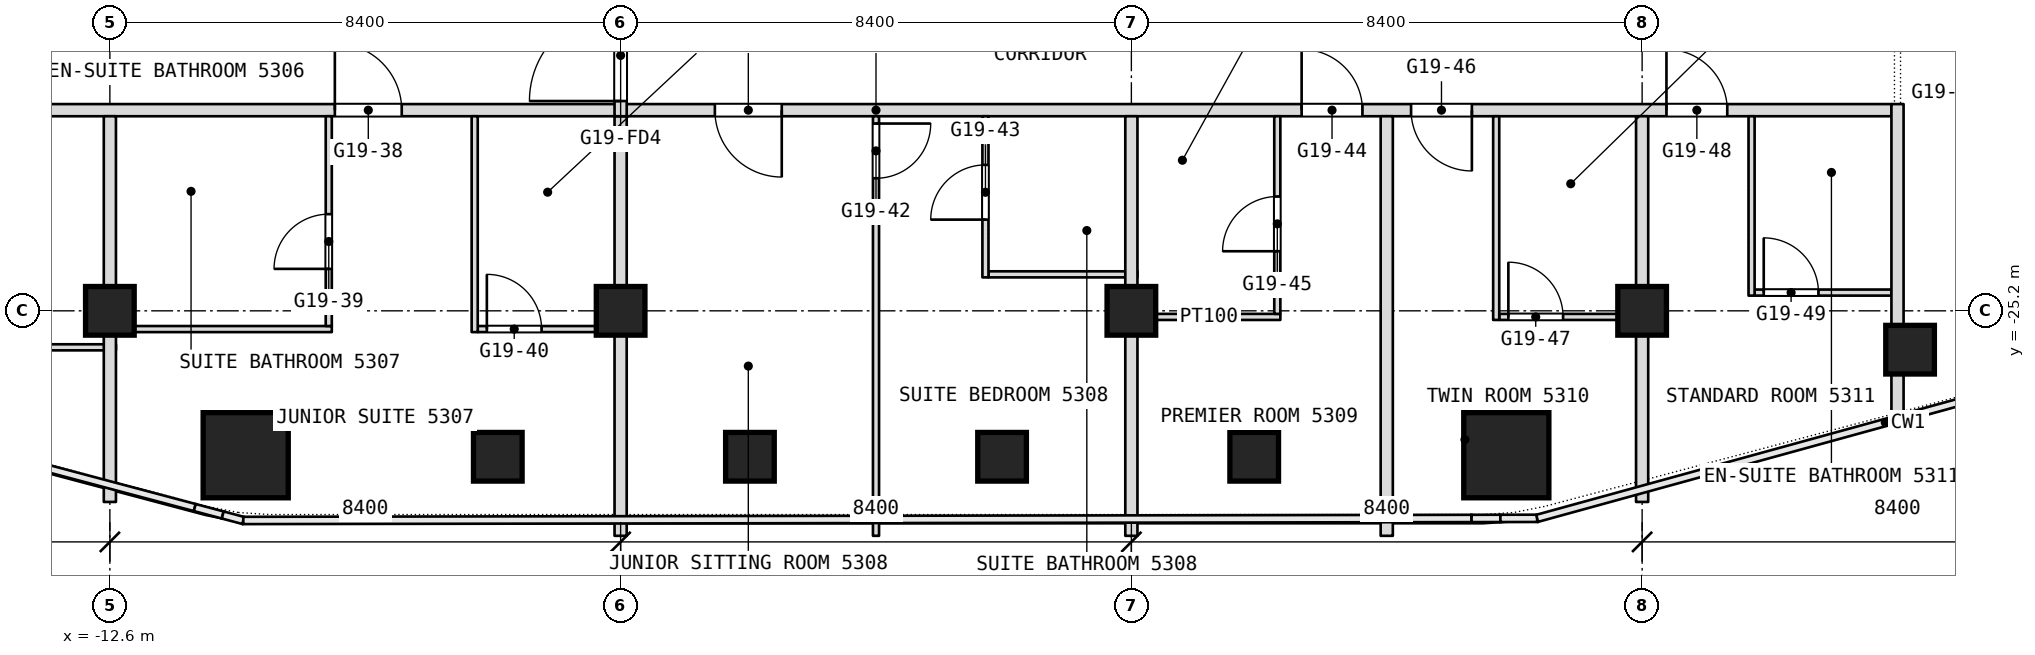
"""IFC4 building model, lengths in metres.
Left out: names, types, materials, properties, quantities, classifications, styles, units other than length and angle.
Written with IfcOpenShell. Run it as: python <this file> out.ifc"""

import sys

from ifc_helpers import new_model, si_unit, direction, frame, frame_2d, origin, origin_2d, place, context, subcontext, project, spatial, rectangle, extrude, element, fill, save


model = new_model("IFC4")
c1 = context("Model", 3, precision=1e-05, world=origin(), true_north=direction((0.0, 1.0)))
c2 = subcontext(c1, "Body", "Model", "MODEL_VIEW")
j1 = project(units=[si_unit("LENGTHUNIT", "METRE"), si_unit("PLANEANGLEUNIT", "RADIAN")], contexts=[c1])
p1 = place(None, origin())
s1 = spatial("IfcSite", under=j1, at=p1, CompositionType="ELEMENT")
p2 = place(p1, origin())
s2 = spatial("IfcBuilding", under=s1, at=p2, CompositionType="ELEMENT")
p3 = place(p2, frame((0.0, 0.0, 227.3)))
s3 = spatial("IfcBuildingStorey", under=s2, at=p3, CompositionType="ELEMENT", Elevation=227.3)
for number, where, z_axis, x_axis in (
    (1, (-10.366, -27.575, 0.0), (0.0, 0.0, 1.0), (1.0, 0.0, 0.0)),
    (2, (10.366, -27.575, 0.0), (0.0, 0.0, 1.0), (1.0, 0.0, 0.0)),
):
    element("IfcColumn", number, at=place(p3, frame(where, z_axis=z_axis, x_axis=x_axis)), inside=s3, PredefinedType="COLUMN", context=c2, shape_type="SweptSolid", body=[
        extrude(rectangle(XDim=1.4, YDim=1.4, at=origin_2d()), origin(), (0.0, 0.0, 1.0), 3.6),
    ])
for number, where, z_axis, x_axis in (
    (3, (-12.6, -25.2, 0.0), (0.0, 0.0, 1.0), (1.0, 0.0, 0.0)),
    (4, (-4.2, -25.2, 0.0), (0.0, 0.0, 1.0), (1.0, 0.0, 0.0)),
    (5, (4.2, -25.2, 0.0), (0.0, 0.0, 1.0), (1.0, 0.0, 0.0)),
    (6, (12.6, -25.2, 0.0), (0.0, 0.0, 1.0), (1.0, 0.0, 0.0)),
    (7, (17.007, -25.839, 0.0), (0.0, 0.0, 1.0), (1.0, 0.0, 0.0)),
    (8, (6.22, -27.6, 0.0), (0.0, 0.0, 1.0), (1.0, 0.0, 0.0)),
    (9, (2.073, -27.6, 0.0), (0.0, 0.0, 1.0), (1.0, 0.0, 0.0)),
    (10, (-2.073, -27.6, 0.0), (0.0, 0.0, 1.0), (1.0, 0.0, 0.0)),
    (11, (-6.22, -27.6, 0.0), (0.0, 0.0, 1.0), (1.0, 0.0, 0.0)),
):
    element("IfcColumn", number, at=place(p3, frame(where, z_axis=z_axis, x_axis=x_axis)), inside=s3, PredefinedType="COLUMN", context=c2, shape_type="SweptSolid", body=[
        extrude(rectangle(XDim=0.8, YDim=0.8, at=origin_2d()), origin(), (0.0, 0.0, 1.0), 3.6),
    ])
p4 = place(p3, frame((-14.95, -25.8, 0.0), z_axis=(0.0, 0.0, 1.0), x_axis=(1.0, 0.0, 0.0)))
e12 = element("IfcWall", 12, at=p4, inside=s3, PredefinedType="PARTITIONING", context=c2, shape_type="SweptSolid", body=[
    extrude(rectangle(XDim=2.45, YDim=0.1, at=frame_2d((1.225, 0.0))), origin(), (0.0, 0.0, 1.0), 3.34),
])
p5 = place(p4, frame((0.15, 0.0, 0.0)))
e13 = element("IfcOpeningElement", 13, at=p5, cuts=e12, PredefinedType="OPENING", context=c2, shape_type="SweptSolid", body=[
    extrude(rectangle(XDim=0.9, YDim=2.1, at=frame_2d((0.45, 1.05))), frame((0.0, 0.05, 0.0), z_axis=(0.0, -1.0, 0.0), x_axis=(1.0, 0.0, 0.0)), (0.0, 0.0, 1.0), 0.1),
])
p6 = place(p3, frame((-12.5, -25.5, 0.0), z_axis=(0.0, 0.0, 1.0), x_axis=(1.0, 0.0, 0.0)))
e14 = element("IfcWall", 14, at=p6, inside=s3, PredefinedType="PARTITIONING", context=c2, shape_type="SweptSolid", body=[
    extrude(rectangle(XDim=3.55, YDim=0.1, at=frame_2d((1.775, 0.0))), origin(), (0.0, 0.0, 1.0), 3.34),
])
p7 = place(p3, frame((-6.55, -25.5, 0.0), z_axis=(0.0, 0.0, 1.0), x_axis=(1.0, 0.0, 0.0)))
e15 = element("IfcWall", 15, at=p7, inside=s3, PredefinedType="PARTITIONING", context=c2, shape_type="SweptSolid", body=[
    extrude(rectangle(XDim=2.45, YDim=0.1, at=frame_2d((1.225, 0.0))), origin(), (0.0, 0.0, 1.0), 3.34),
])
p8 = place(p7, frame((0.15, 0.0, 0.0)))
e16 = element("IfcOpeningElement", 16, at=p8, cuts=e15, PredefinedType="OPENING", context=c2, shape_type="SweptSolid", body=[
    extrude(rectangle(XDim=0.9, YDim=2.1, at=frame_2d((0.45, 1.05))), frame((0.0, 0.05, 0.0), z_axis=(0.0, -1.0, 0.0), x_axis=(1.0, 0.0, 0.0)), (0.0, 0.0, 1.0), 0.1),
])
p9 = place(p3, frame((4.3, -25.3, 0.0), z_axis=(0.0, 0.0, 1.0), x_axis=(1.0, 0.0, 0.0)))
e17 = element("IfcWall", 17, at=p9, inside=s3, PredefinedType="PARTITIONING", context=c2, shape_type="SweptSolid", body=[
    extrude(rectangle(XDim=2.35, YDim=0.1, at=frame_2d((1.175, 0.0))), origin(), (0.0, 0.0, 1.0), 2.94),
])
p10 = place(p3, frame((10.25, -25.3, 0.0), z_axis=(0.0, 0.0, 1.0), x_axis=(1.0, 0.0, 0.0)))
e18 = element("IfcWall", 18, at=p10, inside=s3, PredefinedType="PARTITIONING", context=c2, shape_type="SweptSolid", body=[
    extrude(rectangle(XDim=2.45, YDim=0.1, at=frame_2d((1.225, 0.0))), origin(), (0.0, 0.0, 1.0), 2.94),
])
p11 = place(p10, frame((0.15, 0.0, 0.0)))
e19 = element("IfcOpeningElement", 19, at=p11, cuts=e18, PredefinedType="OPENING", context=c2, shape_type="SweptSolid", body=[
    extrude(rectangle(XDim=0.9, YDim=2.1, at=frame_2d((0.45, 1.05))), frame((0.0, 0.05, 0.0), z_axis=(0.0, -1.0, 0.0), x_axis=(1.0, 0.0, 0.0)), (0.0, 0.0, 1.0), 0.1),
])
p12 = place(p3, frame((14.45, -24.9, 0.0), z_axis=(0.0, 0.0, 1.0), x_axis=(1.0, 0.0, 0.0)))
e20 = element("IfcWall", 20, at=p12, inside=s3, PredefinedType="PARTITIONING", context=c2, shape_type="SweptSolid", body=[
    extrude(rectangle(XDim=2.25, YDim=0.1, at=frame_2d((1.125, 0.0))), origin(), (0.0, 0.0, 1.0), 3.34),
])
p13 = place(p12, frame((0.15, 0.0, 0.0)))
e21 = element("IfcOpeningElement", 21, at=p13, cuts=e20, PredefinedType="OPENING", context=c2, shape_type="SweptSolid", body=[
    extrude(rectangle(XDim=0.9, YDim=2.1, at=frame_2d((0.45, 1.05))), frame((0.0, 0.05, 0.0), z_axis=(0.0, -1.0, 0.0), x_axis=(1.0, 0.0, 0.0)), (0.0, 0.0, 1.0), 0.1),
])
p14 = place(p3, frame((1.85, -24.6, 0.0), z_axis=(0.0, 0.0, 1.0), x_axis=(1.0, 0.0, 0.0)))
e22 = element("IfcWall", 22, at=p14, inside=s3, PredefinedType="PARTITIONING", context=c2, shape_type="SweptSolid", body=[
    extrude(rectangle(XDim=2.45, YDim=0.1, at=frame_2d((1.225, 0.0))), origin(), (0.0, 0.0, 1.0), 3.34),
])
p15 = place(p3, frame((-16.7, -21.9, 0.0), z_axis=(0.0, 0.0, 1.0), x_axis=(1.0, 0.0, 0.0)))
e23 = element("IfcWall", 23, at=p15, inside=s3, PredefinedType="PARTITIONING", context=c2, shape_type="SweptSolid", body=[
    extrude(rectangle(XDim=33.4, YDim=0.2, at=frame_2d((16.7, 0.0))), origin(), (0.0, 0.0, 1.0), 3.34),
])
p16 = place(p15, frame((0.3, 0.0, 0.0)))
e24 = element("IfcOpeningElement", 24, at=p16, cuts=e23, PredefinedType="OPENING", context=c2, shape_type="SweptSolid", body=[
    extrude(rectangle(XDim=1.0, YDim=2.1, at=frame_2d((0.5, 1.05))), frame((0.0, 0.1, 0.0), z_axis=(0.0, -1.0, 0.0), x_axis=(1.0, 0.0, 0.0)), (0.0, 0.0, 1.0), 0.2),
])
p17 = place(p15, frame((7.8, 0.0, 0.0)))
e25 = element("IfcOpeningElement", 25, at=p17, cuts=e23, PredefinedType="OPENING", context=c2, shape_type="SweptSolid", body=[
    extrude(rectangle(XDim=1.1, YDim=2.1, at=frame_2d((0.55, 1.05))), frame((0.0, 0.1, 0.0), z_axis=(0.0, -1.0, 0.0), x_axis=(1.0, 0.0, 0.0)), (0.0, 0.0, 1.0), 0.2),
])
p18 = place(p15, frame((14.05, 0.0, 0.0)))
e26 = element("IfcOpeningElement", 26, at=p18, cuts=e23, PredefinedType="OPENING", context=c2, shape_type="SweptSolid", body=[
    extrude(rectangle(XDim=1.1, YDim=2.1, at=frame_2d((0.55, 1.05))), frame((0.0, 0.1, 0.0), z_axis=(0.0, -1.0, 0.0), x_axis=(1.0, 0.0, 0.0)), (0.0, 0.0, 1.0), 0.2),
])
p19 = place(p15, frame((23.7, 0.0, 0.0)))
e27 = element("IfcOpeningElement", 27, at=p19, cuts=e23, PredefinedType="OPENING", context=c2, shape_type="SweptSolid", body=[
    extrude(rectangle(XDim=1.0, YDim=2.1, at=frame_2d((0.5, 1.05))), frame((0.0, 0.1, 0.0), z_axis=(0.0, -1.0, 0.0), x_axis=(1.0, 0.0, 0.0)), (0.0, 0.0, 1.0), 0.2),
])
p20 = place(p15, frame((25.5, 0.0, 0.0)))
e28 = element("IfcOpeningElement", 28, at=p20, cuts=e23, PredefinedType="OPENING", context=c2, shape_type="SweptSolid", body=[
    extrude(rectangle(XDim=1.0, YDim=2.1, at=frame_2d((0.5, 1.05))), frame((0.0, 0.1, 0.0), z_axis=(0.0, -1.0, 0.0), x_axis=(1.0, 0.0, 0.0)), (0.0, 0.0, 1.0), 0.2),
])
p21 = place(p15, frame((29.7, 0.0, 0.0)))
e29 = element("IfcOpeningElement", 29, at=p21, cuts=e23, PredefinedType="OPENING", context=c2, shape_type="SweptSolid", body=[
    extrude(rectangle(XDim=1.0, YDim=2.1, at=frame_2d((0.5, 1.05))), frame((0.0, 0.1, 0.0), z_axis=(0.0, -1.0, 0.0), x_axis=(1.0, 0.0, 0.0)), (0.0, 0.0, 1.0), 0.2),
])
p22 = place(p3, frame((16.8, -27.229, 0.0), z_axis=(0.0, 0.0, 1.0), x_axis=(0.0, 1.0, 0.0)))
e30 = element("IfcWall", 30, at=p22, inside=s3, PredefinedType="PARTITIONING", context=c2, shape_type="SweptSolid", body=[
    extrude(rectangle(XDim=5.429, YDim=0.2, at=frame_2d((2.714, 0.0))), origin(), (0.0, 0.0, 1.0), 3.34),
])
p23 = place(p3, frame((14.4, -24.95, 0.0), z_axis=(0.0, 0.0, 1.0), x_axis=(0.0, 1.0, 0.0)))
e31 = element("IfcWall", 31, at=p23, inside=s3, PredefinedType="PARTITIONING", context=c2, shape_type="SweptSolid", body=[
    extrude(rectangle(XDim=2.95, YDim=0.1, at=frame_2d((1.475, 0.0))), origin(), (0.0, 0.0, 1.0), 3.34),
])
p24 = place(p3, frame((12.6, -28.343, 0.0), z_axis=(0.0, 0.0, 1.0), x_axis=(0.0, 1.0, 0.0)))
e32 = element("IfcWall", 32, at=p24, inside=s3, PredefinedType="PARTITIONING", context=c2, shape_type="SweptSolid", body=[
    extrude(rectangle(XDim=6.343, YDim=0.2, at=frame_2d((3.171, 0.0))), origin(), (0.0, 0.0, 1.0), 3.34),
])
p25 = place(p3, frame((10.2, -25.35, 0.0), z_axis=(0.0, 0.0, 1.0), x_axis=(0.0, 1.0, 0.0)))
e33 = element("IfcWall", 33, at=p25, inside=s3, PredefinedType="PARTITIONING", context=c2, shape_type="SweptSolid", body=[
    extrude(rectangle(XDim=3.35, YDim=0.1, at=frame_2d((1.675, 0.0))), origin(), (0.0, 0.0, 1.0), 3.34),
])
p26 = place(p3, frame((8.4, -28.9, 0.0), z_axis=(0.0, 0.0, 1.0), x_axis=(0.0, 1.0, 0.0)))
e34 = element("IfcWall", 34, at=p26, inside=s3, PredefinedType="PARTITIONING", context=c2, shape_type="SweptSolid", body=[
    extrude(rectangle(XDim=6.9, YDim=0.2, at=frame_2d((3.45, 0.0))), origin(), (0.0, 0.0, 1.0), 3.34),
])
p27 = place(p3, frame((6.6, -25.25, 0.0), z_axis=(0.0, 0.0, 1.0), x_axis=(0.0, 1.0, 0.0)))
e35 = element("IfcWall", 35, at=p27, inside=s3, PredefinedType="PARTITIONING", context=c2, shape_type="SweptSolid", body=[
    extrude(rectangle(XDim=3.25, YDim=0.1, at=frame_2d((1.625, 0.0))), origin(), (0.0, 0.0, 1.0), 3.34),
])
p28 = place(p27, frame((1.03, 0.0, 0.0)))
e36 = element("IfcOpeningElement", 36, at=p28, cuts=e35, PredefinedType="OPENING", context=c2, shape_type="SweptSolid", body=[
    extrude(rectangle(XDim=0.9, YDim=2.1, at=frame_2d((0.45, 1.05))), frame((0.0, 0.05, 0.0), z_axis=(0.0, -1.0, 0.0), x_axis=(1.0, 0.0, 0.0)), (0.0, 0.0, 1.0), 0.1),
])
p29 = place(p3, frame((4.2, -28.9, 0.0), z_axis=(0.0, 0.0, 1.0), x_axis=(0.0, 1.0, 0.0)))
e37 = element("IfcWall", 37, at=p29, inside=s3, PredefinedType="PARTITIONING", context=c2, shape_type="SweptSolid", body=[
    extrude(rectangle(XDim=6.9, YDim=0.2, at=frame_2d((3.45, 0.0))), origin(), (0.0, 0.0, 1.0), 3.34),
])
p30 = place(p3, frame((1.8, -24.65, 0.0), z_axis=(0.0, 0.0, 1.0), x_axis=(0.0, 1.0, 0.0)))
e38 = element("IfcWall", 38, at=p30, inside=s3, PredefinedType="PARTITIONING", context=c2, shape_type="SweptSolid", body=[
    extrude(rectangle(XDim=2.65, YDim=0.1, at=frame_2d((1.325, 0.0))), origin(), (0.0, 0.0, 1.0), 3.34),
])
p31 = place(p30, frame((0.95, 0.0, 0.0)))
e39 = element("IfcOpeningElement", 39, at=p31, cuts=e38, PredefinedType="OPENING", context=c2, shape_type="SweptSolid", body=[
    extrude(rectangle(XDim=0.9, YDim=2.1, at=frame_2d((0.45, 1.05))), frame((0.0, 0.05, 0.0), z_axis=(0.0, -1.0, 0.0), x_axis=(1.0, 0.0, 0.0)), (0.0, 0.0, 1.0), 0.1),
])
p32 = place(p3, frame((0.0, -28.9, 0.0), z_axis=(0.0, 0.0, 1.0), x_axis=(0.0, 1.0, 0.0)))
e40 = element("IfcWall", 40, at=p32, inside=s3, PredefinedType="PARTITIONING", context=c2, shape_type="SweptSolid", body=[
    extrude(rectangle(XDim=6.9, YDim=0.1, at=frame_2d((3.45, 0.0))), origin(), (0.0, 0.0, 1.0), 3.34),
])
p33 = place(p32, frame((5.88, 0.0, 0.0)))
e41 = element("IfcOpeningElement", 41, at=p33, cuts=e40, PredefinedType="OPENING", context=c2, shape_type="SweptSolid", body=[
    extrude(rectangle(XDim=0.9, YDim=2.1, at=frame_2d((0.45, 1.05))), frame((0.0, 0.05, 0.0), z_axis=(0.0, -1.0, 0.0), x_axis=(1.0, 0.0, 0.0)), (0.0, 0.0, 1.0), 0.1),
])
p34 = place(p3, frame((-4.2, -28.9, 0.0), z_axis=(0.0, 0.0, 1.0), x_axis=(0.0, 1.0, 0.0)))
e42 = element("IfcWall", 42, at=p34, inside=s3, PredefinedType="PARTITIONING", context=c2, shape_type="SweptSolid", body=[
    extrude(rectangle(XDim=6.9, YDim=0.2, at=frame_2d((3.45, 0.0))), origin(), (0.0, 0.0, 1.0), 3.34),
])
p35 = place(p3, frame((-4.2, -22.0, 0.0), z_axis=(0.0, 0.0, 1.0), x_axis=(0.0, 1.0, 0.0)))
e43 = element("IfcWall", 43, at=p35, inside=s3, PredefinedType="PARTITIONING", context=c2, shape_type="SweptSolid", body=[
    extrude(rectangle(XDim=8.4, YDim=0.2, at=frame_2d((4.2, 0.0))), origin(), (0.0, 0.0, 1.0), 3.34),
])
p36 = place(p35, frame((0.25, 0.0, 0.0)))
e44 = element("IfcOpeningElement", 44, at=p36, cuts=e43, PredefinedType="OPENING", context=c2, shape_type="SweptSolid", body=[
    extrude(rectangle(XDim=1.5, YDim=2.1, at=frame_2d((0.75, 1.05))), frame((0.0, 0.1, 0.0), z_axis=(0.0, -1.0, 0.0), x_axis=(1.0, 0.0, 0.0)), (0.0, 0.0, 1.0), 0.2),
])
p37 = place(p3, frame((-6.6, -25.55, 0.0), z_axis=(0.0, 0.0, 1.0), x_axis=(0.0, 1.0, 0.0)))
e45 = element("IfcWall", 45, at=p37, inside=s3, PredefinedType="PARTITIONING", context=c2, shape_type="SweptSolid", body=[
    extrude(rectangle(XDim=3.55, YDim=0.1, at=frame_2d((1.775, 0.0))), origin(), (0.0, 0.0, 1.0), 3.34),
])
p38 = place(p3, frame((-9.0, -25.45, 0.0), z_axis=(0.0, 0.0, 1.0), x_axis=(0.0, 1.0, 0.0)))
e46 = element("IfcWall", 46, at=p38, inside=s3, PredefinedType="PARTITIONING", context=c2, shape_type="SweptSolid", body=[
    extrude(rectangle(XDim=3.45, YDim=0.1, at=frame_2d((1.725, 0.0))), origin(), (0.0, 0.0, 1.0), 3.34),
])
p39 = place(p38, frame((0.94, 0.0, 0.0)))
e47 = element("IfcOpeningElement", 47, at=p39, cuts=e46, PredefinedType="OPENING", context=c2, shape_type="SweptSolid", body=[
    extrude(rectangle(XDim=0.9, YDim=2.1, at=frame_2d((0.45, 1.05))), frame((0.0, 0.05, 0.0), z_axis=(0.0, -1.0, 0.0), x_axis=(1.0, 0.0, 0.0)), (0.0, 0.0, 1.0), 0.1),
])
p40 = place(p3, frame((-12.6, -28.343, 0.0), z_axis=(0.0, 0.0, 1.0), x_axis=(0.0, 1.0, 0.0)))
e48 = element("IfcWall", 48, at=p40, inside=s3, PredefinedType="PARTITIONING", context=c2, shape_type="SweptSolid", body=[
    extrude(rectangle(XDim=6.343, YDim=0.2, at=frame_2d((3.171, 0.0))), origin(), (0.0, 0.0, 1.0), 3.34),
])
p41 = place(p8, origin())
e49 = element("IfcDoor", 49, at=p41, inside=s3, OperationType="SINGLE_SWING_LEFT", PredefinedType="DOOR", context=c2, shape_type="SweptSolid", body=[
    extrude(rectangle(XDim=0.9, YDim=2.1, at=frame_2d((0.45, 1.05))), frame((0.0, 0.025, 0.0), z_axis=(0.0, -1.0, 0.0), x_axis=(1.0, 0.0, 0.0)), (0.0, 0.0, 1.0), 0.05),
])
fill(e16, e49)
p42 = place(p11, origin())
e50 = element("IfcDoor", 50, at=p42, inside=s3, OperationType="SINGLE_SWING_LEFT", PredefinedType="DOOR", context=c2, shape_type="SweptSolid", body=[
    extrude(rectangle(XDim=0.9, YDim=2.1, at=frame_2d((0.45, 1.05))), frame((0.0, 0.025, 0.0), z_axis=(0.0, -1.0, 0.0), x_axis=(1.0, 0.0, 0.0)), (0.0, 0.0, 1.0), 0.05),
])
fill(e19, e50)
p43 = place(p13, origin())
e51 = element("IfcDoor", 51, at=p43, inside=s3, OperationType="SINGLE_SWING_LEFT", PredefinedType="DOOR", context=c2, shape_type="SweptSolid", body=[
    extrude(rectangle(XDim=0.9, YDim=2.1, at=frame_2d((0.45, 1.05))), frame((0.0, 0.025, 0.0), z_axis=(0.0, -1.0, 0.0), x_axis=(1.0, 0.0, 0.0)), (0.0, 0.0, 1.0), 0.05),
])
fill(e21, e51)
p44 = place(p17, origin())
e52 = element("IfcDoor", 52, at=p44, inside=s3, OperationType="SINGLE_SWING_RIGHT", PredefinedType="DOOR", context=c2, shape_type="SweptSolid", body=[
    extrude(rectangle(XDim=1.1, YDim=2.1, at=frame_2d((0.55, 1.05))), frame((0.0, 0.025, 0.0), z_axis=(0.0, -1.0, 0.0), x_axis=(1.0, 0.0, 0.0)), (0.0, 0.0, 1.0), 0.05),
])
fill(e25, e52)
p45 = place(p18, origin())
e53 = element("IfcDoor", 53, at=p45, inside=s3, OperationType="SINGLE_SWING_LEFT", PredefinedType="DOOR", context=c2, shape_type="SweptSolid", body=[
    extrude(rectangle(XDim=1.1, YDim=2.1, at=frame_2d((0.55, 1.05))), frame((0.0, 0.025, 0.0), z_axis=(0.0, -1.0, 0.0), x_axis=(1.0, 0.0, 0.0)), (0.0, 0.0, 1.0), 0.05),
])
fill(e26, e53)
p46 = place(p19, origin())
e54 = element("IfcDoor", 54, at=p46, inside=s3, OperationType="SINGLE_SWING_RIGHT", PredefinedType="DOOR", context=c2, shape_type="SweptSolid", body=[
    extrude(rectangle(XDim=1.0, YDim=2.1, at=frame_2d((0.5, 1.05))), frame((0.0, 0.025, 0.0), z_axis=(0.0, -1.0, 0.0), x_axis=(1.0, 0.0, 0.0)), (0.0, 0.0, 1.0), 0.05),
])
fill(e27, e54)
p47 = place(p20, origin())
e55 = element("IfcDoor", 55, at=p47, inside=s3, OperationType="SINGLE_SWING_RIGHT", PredefinedType="DOOR", context=c2, shape_type="SweptSolid", body=[
    extrude(rectangle(XDim=1.0, YDim=2.1, at=frame_2d((0.5, 1.05))), frame((0.0, 0.025, 0.0), z_axis=(0.0, -1.0, 0.0), x_axis=(1.0, 0.0, 0.0)), (0.0, 0.0, 1.0), 0.05),
])
fill(e28, e55)
p48 = place(p21, origin())
e56 = element("IfcDoor", 56, at=p48, inside=s3, OperationType="SINGLE_SWING_RIGHT", PredefinedType="DOOR", context=c2, shape_type="SweptSolid", body=[
    extrude(rectangle(XDim=1.0, YDim=2.1, at=frame_2d((0.5, 1.05))), frame((0.0, 0.025, 0.0), z_axis=(0.0, -1.0, 0.0), x_axis=(1.0, 0.0, 0.0)), (0.0, 0.0, 1.0), 0.05),
])
fill(e29, e56)
p49 = place(p28, origin())
e57 = element("IfcDoor", 57, at=p49, inside=s3, OperationType="SINGLE_SWING_LEFT", PredefinedType="DOOR", context=c2, shape_type="SweptSolid", body=[
    extrude(rectangle(XDim=0.9, YDim=2.1, at=frame_2d((0.45, 1.05))), frame((0.0, 0.025, 0.0), z_axis=(0.0, -1.0, 0.0), x_axis=(1.0, 0.0, 0.0)), (0.0, 0.0, 1.0), 0.05),
])
fill(e36, e57)
p50 = place(p31, origin())
e58 = element("IfcDoor", 58, at=p50, inside=s3, OperationType="SINGLE_SWING_LEFT", PredefinedType="DOOR", context=c2, shape_type="SweptSolid", body=[
    extrude(rectangle(XDim=0.9, YDim=2.1, at=frame_2d((0.45, 1.05))), frame((0.0, 0.025, 0.0), z_axis=(0.0, -1.0, 0.0), x_axis=(1.0, 0.0, 0.0)), (0.0, 0.0, 1.0), 0.05),
])
fill(e39, e58)
p51 = place(p33, origin())
e59 = element("IfcDoor", 59, at=p51, inside=s3, OperationType="SINGLE_SWING_LEFT", PredefinedType="DOOR", context=c2, shape_type="SweptSolid", body=[
    extrude(rectangle(XDim=0.9, YDim=2.1, at=frame_2d((0.45, 1.05))), frame((0.0, 0.025, 0.0), z_axis=(0.0, -1.0, 0.0), x_axis=(1.0, 0.0, 0.0)), (0.0, 0.0, 1.0), 0.05),
])
fill(e41, e59)
p52 = place(p39, origin())
e60 = element("IfcDoor", 60, at=p52, inside=s3, OperationType="SINGLE_SWING_LEFT", PredefinedType="DOOR", context=c2, shape_type="SweptSolid", body=[
    extrude(rectangle(XDim=0.9, YDim=2.1, at=frame_2d((0.45, 1.05))), frame((0.0, 0.025, 0.0), z_axis=(0.0, -1.0, 0.0), x_axis=(1.0, 0.0, 0.0)), (0.0, 0.0, 1.0), 0.05),
])
fill(e47, e60)
p53 = place(p36, origin())
e61 = element("IfcDoor", 61, at=p53, inside=s3, OperationType="DOUBLE_DOOR_DOUBLE_SWING", PredefinedType="DOOR", context=c2, shape_type="SweptSolid", body=[
    extrude(rectangle(XDim=1.5, YDim=2.1, at=frame_2d((0.75, 1.05))), frame((0.0, 0.025, 0.0), z_axis=(0.0, -1.0, 0.0), x_axis=(1.0, 0.0, 0.0)), (0.0, 0.0, 1.0), 0.05),
])
fill(e44, e61)
save(model, sys.argv[1])
